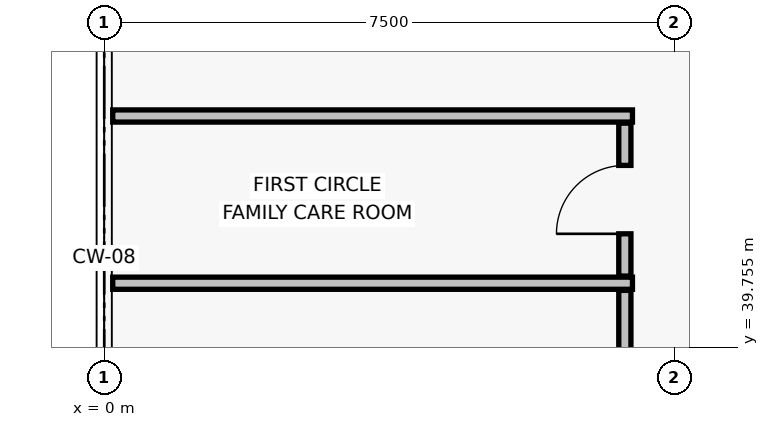
"""IFC4 building model, lengths in metres.
Left out: names, types, materials, properties, quantities, classifications, styles, units other than length and angle.
Written with IfcOpenShell. Run it as: python <this file> out.ifc"""

import sys

from ifc_helpers import new_model, si_unit, direction, frame, frame_2d, origin, place, context, subcontext, project, spatial, rectangle, extrude, element, fill, save


model = new_model("IFC4")
c1 = context("Model", 3, precision=1e-05, world=origin(), true_north=direction((0.0, 1.0)))
c2 = subcontext(c1, "Body", "Model", "MODEL_VIEW")
j1 = project(units=[si_unit("LENGTHUNIT", "METRE"), si_unit("PLANEANGLEUNIT", "RADIAN")], contexts=[c1])
p1 = place(None, origin())
s1 = spatial("IfcSite", under=j1, at=p1, CompositionType="ELEMENT")
p2 = place(p1, origin())
s2 = spatial("IfcBuilding", under=s1, at=p2, CompositionType="ELEMENT")
p3 = place(p2, frame((0.0, 0.0, 9.0)))
s3 = spatial("IfcBuildingStorey", under=s2, at=p3, CompositionType="ELEMENT", Elevation=9.0)
for number, where, z_axis, x_axis in (
    (1, (0.112, 40.6, 0.0), (0.0, 0.0, 1.0), (1.0, 0.0, 0.0)),
    (2, (0.112, 42.8, 0.0), (0.0, 0.0, 1.0), (1.0, 0.0, 0.0)),
):
    element("IfcWall", number, at=place(p3, frame(where, z_axis=z_axis, x_axis=x_axis)), inside=s3, PredefinedType="PARTITIONING", context=c2, shape_type="SweptSolid", body=[
        extrude(rectangle(XDim=6.838, YDim=0.16, at=frame_2d((3.419, 0.0))), origin(), (0.0, 0.0, 1.0), 3.27),
    ])
p4 = place(p3, frame((6.85, 37.594, 0.0), z_axis=(0.0, 0.0, 1.0), x_axis=(0.0, 1.0, 0.0)))
e3 = element("IfcWall", 3, at=p4, inside=s3, PredefinedType="PARTITIONING", context=c2, shape_type="SweptSolid", body=[
    extrude(rectangle(XDim=2.912, YDim=0.16, at=frame_2d((1.456, 0.0))), origin(), (0.0, 0.0, 1.0), 2.87),
])
p5 = place(p4, frame((0.981, 0.0, 0.0)))
e4 = element("IfcOpeningElement", 4, at=p5, cuts=e3, PredefinedType="OPENING", context=c2, shape_type="SweptSolid", body=[
    extrude(rectangle(XDim=0.95, YDim=2.1, at=frame_2d((0.475, 1.05))), frame((0.0, 0.09, 0.0), z_axis=(0.0, -1.0, 0.0), x_axis=(1.0, 0.0, 0.0)), (0.0, 0.0, 1.0), 0.18),
])
p6 = place(p3, frame((6.85, 40.694, 0.0), z_axis=(0.0, 0.0, 1.0), x_axis=(0.0, 1.0, 0.0)))
e5 = element("IfcWall", 5, at=p6, inside=s3, PredefinedType="PARTITIONING", context=c2, shape_type="SweptSolid", body=[
    extrude(rectangle(XDim=2.012, YDim=0.16, at=frame_2d((1.006, 0.0))), origin(), (0.0, 0.0, 1.0), 3.27),
])
p7 = place(p6, frame((0.556, 0.0, 0.0)))
e6 = element("IfcOpeningElement", 6, at=p7, cuts=e5, PredefinedType="OPENING", context=c2, shape_type="SweptSolid", body=[
    extrude(rectangle(XDim=0.9, YDim=2.1, at=frame_2d((0.45, 1.05))), frame((0.0, 0.09, 0.0), z_axis=(0.0, -1.0, 0.0), x_axis=(1.0, 0.0, 0.0)), (0.0, 0.0, 1.0), 0.18),
])
p8 = place(p7, origin())
e7 = element("IfcDoor", 7, at=p8, inside=s3, OperationType="SINGLE_SWING_LEFT", PredefinedType="DOOR", context=c2, shape_type="SweptSolid", body=[
    extrude(rectangle(XDim=0.9, YDim=2.1, at=frame_2d((0.45, 1.05))), frame((0.0, 0.025, 0.0), z_axis=(0.0, -1.0, 0.0), x_axis=(1.0, 0.0, 0.0)), (0.0, 0.0, 1.0), 0.05),
])
fill(e6, e7)
save(model, sys.argv[1])
